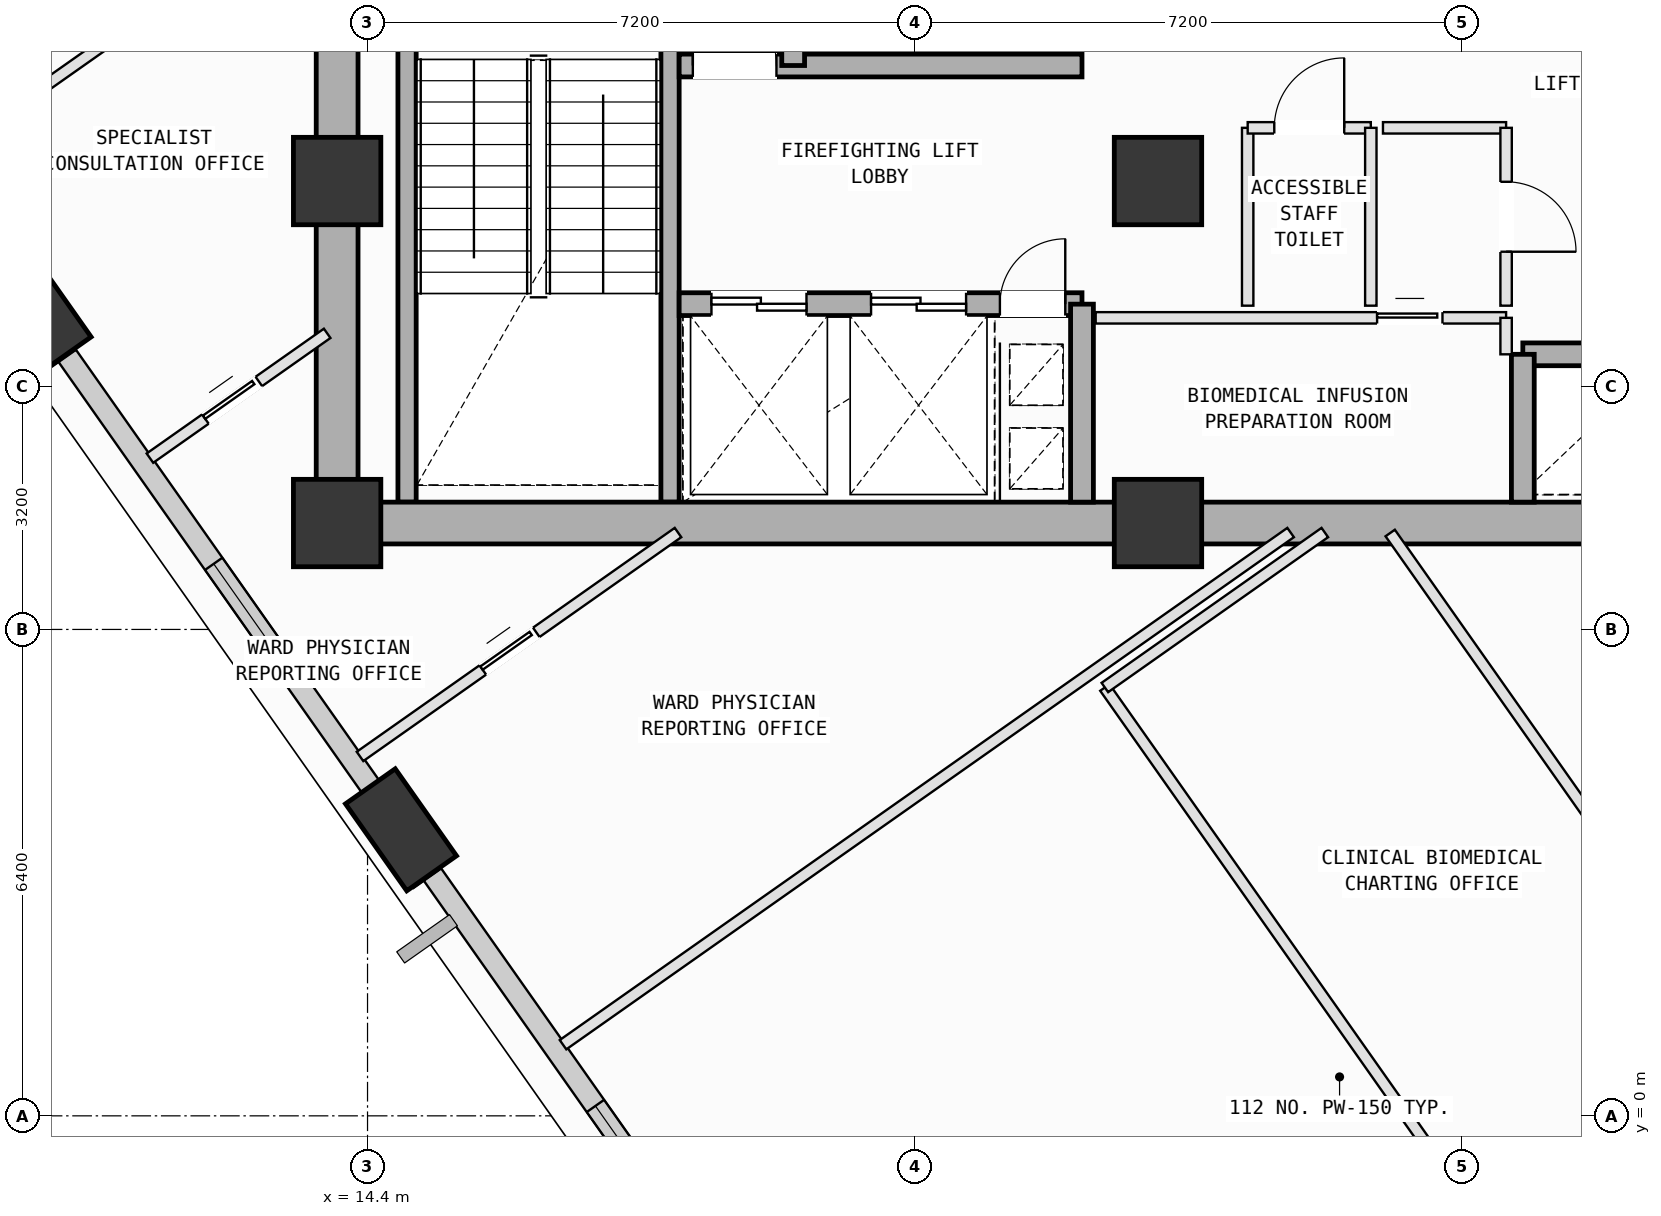
"""IFC4 building model, lengths in metres.
Left out: names, types, materials, properties, quantities, classifications, styles, units other than length and angle.
Written with IfcOpenShell. Run it as: python <this file> out.ifc"""

import sys

from ifc_helpers import new_model, si_unit, direction, frame, frame_2d, origin, origin_2d, place, context, subcontext, project, spatial, rectangle, extrude, element, fill, save


model = new_model("IFC4")
c1 = context("Model", 3, precision=1e-05, world=origin(), true_north=direction((0.0, 1.0)))
c2 = subcontext(c1, "Body", "Model", "MODEL_VIEW")
j1 = project(units=[si_unit("LENGTHUNIT", "METRE"), si_unit("PLANEANGLEUNIT", "RADIAN")], contexts=[c1])
p1 = place(None, origin())
s1 = spatial("IfcSite", under=j1, at=p1, CompositionType="ELEMENT")
p2 = place(p1, origin())
s2 = spatial("IfcBuilding", under=s1, at=p2, CompositionType="ELEMENT")
p3 = place(p2, frame((0.0, 0.0, 173.8)))
s3 = spatial("IfcBuildingStorey", under=s2, at=p3, CompositionType="ELEMENT", Elevation=173.8)
for number, where, z_axis, x_axis in (
    (1, (14.0, 7.8, 0.0), (0.0, 0.0, 1.0), (1.0, 0.0, 0.0)),
    (2, (14.0, 12.3, 0.0), (0.0, 0.0, 1.0), (1.0, 0.0, 0.0)),
    (3, (24.8, 7.8, 0.0), (0.0, 0.0, 1.0), (1.0, 0.0, 0.0)),
    (4, (24.8, 12.3, 0.0), (0.0, 0.0, 1.0), (1.0, 0.0, 0.0)),
):
    element("IfcColumn", number, at=place(p3, frame(where, z_axis=z_axis, x_axis=x_axis)), inside=s3, PredefinedType="COLUMN", context=c2, shape_type="SweptSolid", body=[
        extrude(rectangle(XDim=1.15, YDim=1.15, at=origin_2d()), origin(), (0.0, 0.0, 1.0), 4.0),
    ])
p4 = place(p3, frame((10.033, 10.591, 0.002), z_axis=(0.059361981689, -0.096569440559, 0.993554476755), x_axis=(-0.915889100043, 0.390585013166, 0.092684971335)))
e5 = element("IfcColumn", 5, at=p4, inside=s3, PredefinedType="COLUMN", context=c2, shape_type="SweptSolid", body=[
    extrude(rectangle(XDim=1.4, YDim=0.8, at=origin_2d()), origin(), (0.0, 0.0, 1.0), 4.022),
])
p5 = place(p3, frame((14.84, 3.763, 0.002), z_axis=(0.087255397934, -0.076515338522, 0.993243121548), x_axis=(-0.990187937377, 0.102585483116, 0.094889764076)))
e6 = element("IfcColumn", 6, at=p5, inside=s3, PredefinedType="COLUMN", context=c2, shape_type="SweptSolid", body=[
    extrude(rectangle(XDim=1.4, YDim=0.8, at=origin_2d()), origin(), (0.0, 0.0, 1.0), 4.023),
])
p6 = place(p3, frame((14.687, 3.981, 0.0), z_axis=(0.0, 0.0, 1.0), x_axis=(-0.575708660285, 0.817654901822, 0.0)))
e7 = element("IfcWall", 7, at=p6, inside=s3, PredefinedType="SOLIDWALL", context=c2, shape_type="SweptSolid", body=[
    extrude(rectangle(XDim=7.36, YDim=0.28, at=frame_2d((3.68, 0.0))), origin(), (0.0, 0.0, 1.0), 3.065),
])
p7 = place(p6, frame((2.614, 0.0, 0.75)))
e8 = element("IfcOpeningElement", 8, at=p7, cuts=e7, PredefinedType="OPENING", context=c2, shape_type="SweptSolid", body=[
    extrude(rectangle(XDim=1.4, YDim=1.85, at=frame_2d((0.7, 0.925))), frame((0.0, 0.15, 0.0), z_axis=(0.0, -1.0, 0.0), x_axis=(1.0, 0.0, 0.0)), (0.0, 0.0, 1.0), 0.3),
])
p8 = place(p3, frame((18.838, -1.914, 0.0), z_axis=(0.0, 0.0, 1.0), x_axis=(-0.575721738491, 0.817645693334, 0.0)))
e9 = element("IfcWall", 9, at=p8, inside=s3, PredefinedType="SOLIDWALL", context=c2, shape_type="SweptSolid", body=[
    extrude(rectangle(XDim=6.223, YDim=0.28, at=frame_2d((3.112, 0.0))), origin(), (0.0, 0.0, 1.0), 3.065),
])
p9 = place(p8, frame((0.7, 0.0, 0.75)))
e10 = element("IfcOpeningElement", 10, at=p9, cuts=e9, PredefinedType="OPENING", context=c2, shape_type="SweptSolid", body=[
    extrude(rectangle(XDim=1.8, YDim=2.05, at=frame_2d((0.9, 1.025))), frame((0.0, 0.15, 0.0), z_axis=(0.0, -1.0, 0.0), x_axis=(1.0, 0.0, 0.0)), (0.0, 0.0, 1.0), 0.3),
])
for number, where, z_axis, x_axis in (
    (11, (18.38, 15.12, 0.0), (0.0, 0.0, 1.0), (0.0, -1.0, 0.0)),
    (12, (14.92, 8.075, 0.0), (0.0, 0.0, 1.0), (0.0, 1.0, 0.0)),
):
    element("IfcWall", number, at=place(p3, frame(where, z_axis=z_axis, x_axis=x_axis)), inside=s3, PredefinedType="SOLIDWALL", context=c2, shape_type="SweptSolid", body=[
        extrude(rectangle(XDim=7.045, YDim=0.24, at=frame_2d((3.522, 0.0))), origin(), (0.0, 0.0, 1.0), 3.78),
    ])
for number, where, z_axis, x_axis in (
    (13, (14.0, 7.8, 0.0), (0.0, 0.0, 1.0), (1.0, 0.0, 0.0)),
    (14, (24.8, 7.8, 0.0), (0.0, 0.0, 1.0), (1.0, 0.0, 0.0)),
):
    element("IfcWall", number, at=place(p3, frame(where, z_axis=z_axis, x_axis=x_axis)), inside=s3, PredefinedType="SHEAR", context=c2, shape_type="SweptSolid", body=[
        extrude(rectangle(XDim=10.8, YDim=0.55, at=frame_2d((5.4, 0.0))), origin(), (0.0, 0.0, 1.0), 3.78),
    ])
p10 = place(p3, frame((14.0, 16.8, 0.0), z_axis=(0.0, 0.0, 1.0), x_axis=(0.0, -1.0, 0.0)))
e15 = element("IfcWall", 15, at=p10, inside=s3, PredefinedType="SHEAR", context=c2, shape_type="SweptSolid", body=[
    extrude(rectangle(XDim=9.0, YDim=0.55, at=frame_2d((4.5, 0.0))), origin(), (0.0, 0.0, 1.0), 3.78),
])
p11 = place(p3, frame((18.5, 10.68, 0.0), z_axis=(0.0, 0.0, 1.0), x_axis=(1.0, 0.0, 0.0)))
e16 = element("IfcWall", 16, at=p11, inside=s3, PredefinedType="SOLIDWALL", context=c2, shape_type="SweptSolid", body=[
    extrude(rectangle(XDim=5.3, YDim=0.3, at=frame_2d((2.65, 0.0))), origin(), (0.0, 0.0, 1.0), 3.78),
])
p12 = place(p11, frame((4.22, 0.0, 0.0)))
e17 = element("IfcOpeningElement", 17, at=p12, cuts=e16, PredefinedType="OPENING", context=c2, shape_type="SweptSolid", body=[
    extrude(rectangle(XDim=0.86, YDim=2.06, at=frame_2d((0.43, 1.03))), frame((0.0, 0.16, 0.0), z_axis=(0.0, -1.0, 0.0), x_axis=(1.0, 0.0, 0.0)), (0.0, 0.0, 1.0), 0.32),
])
p13 = place(p11, frame((0.425, 0.0, 0.0)))
e18 = element("IfcOpeningElement", 18, at=p13, cuts=e16, PredefinedType="OPENING", context=c2, shape_type="SweptSolid", body=[
    extrude(rectangle(XDim=1.25, YDim=2.18, at=frame_2d((0.625, 1.09))), frame((0.0, 0.16, 0.0), z_axis=(0.0, -1.0, 0.0), x_axis=(1.0, 0.0, 0.0)), (0.0, 0.0, 1.0), 0.32),
])
p14 = place(p11, frame((2.525, 0.0, 0.0)))
e19 = element("IfcOpeningElement", 19, at=p14, cuts=e16, PredefinedType="OPENING", context=c2, shape_type="SweptSolid", body=[
    extrude(rectangle(XDim=1.25, YDim=2.18, at=frame_2d((0.625, 1.09))), frame((0.0, 0.16, 0.0), z_axis=(0.0, -1.0, 0.0), x_axis=(1.0, 0.0, 0.0)), (0.0, 0.0, 1.0), 0.32),
])
p15 = place(p3, frame((18.5, 13.82, 0.0), z_axis=(0.0, 0.0, 1.0), x_axis=(1.0, 0.0, 0.0)))
e20 = element("IfcWall", 20, at=p15, inside=s3, PredefinedType="SOLIDWALL", context=c2, shape_type="SweptSolid", body=[
    extrude(rectangle(XDim=5.3, YDim=0.3, at=frame_2d((2.65, 0.0))), origin(), (0.0, 0.0, 1.0), 3.78),
])
p16 = place(p15, frame((0.18, 0.0, 0.0)))
e21 = element("IfcOpeningElement", 21, at=p16, cuts=e20, PredefinedType="OPENING", context=c2, shape_type="SweptSolid", body=[
    extrude(rectangle(XDim=1.1, YDim=2.15, at=frame_2d((0.55, 1.075))), frame((0.0, 0.16, 0.0), z_axis=(0.0, -1.0, 0.0), x_axis=(1.0, 0.0, 0.0)), (0.0, 0.0, 1.0), 0.32),
])
p17 = place(p3, frame((23.8, 8.075, 0.0), z_axis=(0.0, 0.0, 1.0), x_axis=(0.0, 1.0, 0.0)))
e22 = element("IfcWall", 22, at=p17, inside=s3, PredefinedType="SOLIDWALL", context=c2, shape_type="SweptSolid", body=[
    extrude(rectangle(XDim=2.605, YDim=0.3, at=frame_2d((1.302, 0.0))), origin(), (0.0, 0.0, 1.0), 3.78),
])
p18 = place(p3, frame((20.0, 13.82, 0.0), z_axis=(0.0, 0.0, 1.0), x_axis=(0.0, 1.0, 0.0)))
e23 = element("IfcWall", 23, at=p18, inside=s3, PredefinedType="SOLIDWALL", context=c2, shape_type="SweptSolid", body=[
    extrude(rectangle(XDim=2.73, YDim=0.3, at=frame_2d((1.365, 0.0))), origin(), (0.0, 0.0, 1.0), 3.78),
])
p19 = place(p3, frame((29.6, 10.02, 0.0), z_axis=(0.0, 0.0, 1.0), x_axis=(1.0, 0.0, 0.0)))
e24 = element("IfcWall", 24, at=p19, inside=s3, PredefinedType="SOLIDWALL", context=c2, shape_type="SweptSolid", body=[
    extrude(rectangle(XDim=1.7, YDim=0.3, at=frame_2d((0.85, 0.0))), origin(), (0.0, 0.0, 1.0), 3.78),
])
p20 = place(p3, frame((29.6, 8.075, 0.0), z_axis=(0.0, 0.0, 1.0), x_axis=(0.0, 1.0, 0.0)))
e25 = element("IfcWall", 25, at=p20, inside=s3, PredefinedType="SOLIDWALL", context=c2, shape_type="SweptSolid", body=[
    extrude(rectangle(XDim=1.945, YDim=0.3, at=frame_2d((0.973, 0.0))), origin(), (0.0, 0.0, 1.0), 3.78),
])
p21 = place(p3, frame((23.98, 10.5, 0.0), z_axis=(0.0, 0.0, 1.0), x_axis=(1.0, 0.0, 0.0)))
e26 = element("IfcWall", 26, at=p21, inside=s3, PredefinedType="PARTITIONING", context=c2, shape_type="SweptSolid", body=[
    extrude(rectangle(XDim=5.4, YDim=0.15, at=frame_2d((2.7, 0.0))), origin(), (0.0, 0.0, 1.0), 3.78),
])
p22 = place(p21, frame((3.703, 0.0, 0.0)))
e27 = element("IfcOpeningElement", 27, at=p22, cuts=e26, PredefinedType="OPENING", context=c2, shape_type="SweptSolid", body=[
    extrude(rectangle(XDim=0.86, YDim=2.06, at=frame_2d((0.43, 1.03))), frame((0.0, 0.085, 0.0), z_axis=(0.0, -1.0, 0.0), x_axis=(1.0, 0.0, 0.0)), (0.0, 0.0, 1.0), 0.17),
])
p23 = place(p3, frame((29.38, 10.5, 0.0), z_axis=(0.0, 0.0, 1.0), x_axis=(0.0, -1.0, 0.0)))
e28 = element("IfcWall", 28, at=p23, inside=s3, PredefinedType="PARTITIONING", context=c2, shape_type="SweptSolid", body=[
    extrude(rectangle(XDim=0.48, YDim=0.15, at=frame_2d((0.24, 0.0))), origin(), (0.0, 0.0, 1.0), 3.78),
])
p24 = place(p3, frame((25.98, 10.66, 0.0), z_axis=(0.0, 0.0, 1.0), x_axis=(0.0, 1.0, 0.0)))
e29 = element("IfcWall", 29, at=p24, inside=s3, PredefinedType="PARTITIONING", context=c2, shape_type="SweptSolid", body=[
    extrude(rectangle(XDim=2.34, YDim=0.15, at=frame_2d((1.17, 0.0))), origin(), (0.0, 0.0, 1.0), 3.78),
])
p25 = place(p3, frame((25.98, 13.0, 0.0), z_axis=(0.0, 0.0, 1.0), x_axis=(1.0, 0.0, 0.0)))
e30 = element("IfcWall", 30, at=p25, inside=s3, PredefinedType="PARTITIONING", context=c2, shape_type="SweptSolid", body=[
    extrude(rectangle(XDim=1.62, YDim=0.15, at=frame_2d((0.81, 0.0))), origin(), (0.0, 0.0, 1.0), 3.78),
])
p26 = place(p25, frame((0.35, 0.0, 0.0)))
e31 = element("IfcOpeningElement", 31, at=p26, cuts=e30, PredefinedType="OPENING", context=c2, shape_type="SweptSolid", body=[
    extrude(rectangle(XDim=0.92, YDim=2.1, at=frame_2d((0.46, 1.05))), frame((0.0, 0.085, 0.0), z_axis=(0.0, -1.0, 0.0), x_axis=(1.0, 0.0, 0.0)), (0.0, 0.0, 1.0), 0.17),
])
p27 = place(p3, frame((27.6, 13.0, 0.0), z_axis=(0.0, 0.0, 1.0), x_axis=(0.0, -1.0, 0.0)))
e32 = element("IfcWall", 32, at=p27, inside=s3, PredefinedType="PARTITIONING", context=c2, shape_type="SweptSolid", body=[
    extrude(rectangle(XDim=2.34, YDim=0.15, at=frame_2d((1.17, 0.0))), origin(), (0.0, 0.0, 1.0), 3.78),
])
p28 = place(p3, frame((27.76, 13.0, 0.0), z_axis=(0.0, 0.0, 1.0), x_axis=(1.0, 0.0, 0.0)))
e33 = element("IfcWall", 33, at=p28, inside=s3, PredefinedType="PARTITIONING", context=c2, shape_type="SweptSolid", body=[
    extrude(rectangle(XDim=1.62, YDim=0.15, at=frame_2d((0.81, 0.0))), origin(), (0.0, 0.0, 1.0), 3.78),
])
p29 = place(p3, frame((29.38, 13.0, 0.0), z_axis=(0.0, 0.0, 1.0), x_axis=(0.0, -1.0, 0.0)))
e34 = element("IfcWall", 34, at=p29, inside=s3, PredefinedType="PARTITIONING", context=c2, shape_type="SweptSolid", body=[
    extrude(rectangle(XDim=2.34, YDim=0.15, at=frame_2d((1.17, 0.0))), origin(), (0.0, 0.0, 1.0), 3.78),
])
p30 = place(p29, frame((0.71, 0.0, 0.0)))
e35 = element("IfcOpeningElement", 35, at=p30, cuts=e34, PredefinedType="OPENING", context=c2, shape_type="SweptSolid", body=[
    extrude(rectangle(XDim=0.92, YDim=2.1, at=frame_2d((0.46, 1.05))), frame((0.0, 0.085, 0.0), z_axis=(0.0, -1.0, 0.0), x_axis=(1.0, 0.0, 0.0)), (0.0, 0.0, 1.0), 0.17),
])
p31 = place(p3, frame((30.972, -4.122, 0.0), z_axis=(0.0, 0.0, 1.0), x_axis=(-0.57572141369, 0.817645922034, 0.0)))
e36 = element("IfcWall", 36, at=p31, inside=s3, PredefinedType="PARTITIONING", context=c2, shape_type="SweptSolid", body=[
    extrude(rectangle(XDim=11.934, YDim=0.15, at=frame_2d((5.967, 0.0))), origin(), (0.0, 0.0, 1.0), 3.78),
])
p32 = place(p3, frame((24.101, 5.636, 0.0), z_axis=(0.0, 0.0, 1.0), x_axis=(0.817472101836, 0.575968195928, 0.0)))
e37 = element("IfcWall", 37, at=p32, inside=s3, PredefinedType="PARTITIONING", context=c2, shape_type="SweptSolid", body=[
    extrude(rectangle(XDim=3.54, YDim=0.15, at=frame_2d((1.77, 0.0))), origin(), (0.0, 0.0, 1.0), 3.78),
])
p33 = place(p3, frame((27.855, 7.669, 0.0), z_axis=(0.0, 0.0, 1.0), x_axis=(0.57575409581, -0.8176229089, 0.0)))
e38 = element("IfcWall", 38, at=p33, inside=s3, PredefinedType="PARTITIONING", context=c2, shape_type="SweptSolid", body=[
    extrude(rectangle(XDim=11.435, YDim=0.15, at=frame_2d((5.718, 0.0))), origin(), (0.0, 0.0, 1.0), 3.78),
])
p34 = place(p33, frame((5.471, 0.0, 0.0)))
e39 = element("IfcOpeningElement", 39, at=p34, cuts=e38, PredefinedType="OPENING", context=c2, shape_type="SweptSolid", body=[
    extrude(rectangle(XDim=0.86, YDim=2.06, at=frame_2d((0.43, 1.03))), frame((0.0, 0.085, 0.0), z_axis=(0.0, -1.0, 0.0), x_axis=(1.0, 0.0, 0.0)), (0.0, 0.0, 1.0), 0.17),
])
p35 = place(p3, frame((15.067, 3.042, 0.0), z_axis=(0.0, 0.0, 1.0), x_axis=(-0.575419868923, 0.817858162794, 0.0)))
e40 = element("IfcWall", 40, at=p35, inside=s3, PredefinedType="PARTITIONING", context=c2, shape_type="SweptSolid", body=[
    extrude(rectangle(XDim=0.987, YDim=0.15, at=frame_2d((0.493, 0.0))), origin(), (0.0, 0.0, 1.0), 3.065),
])
p36 = place(p3, frame((14.301, 4.729, 0.0), z_axis=(0.0, 0.0, 1.0), x_axis=(0.81765087294, 0.575714382295, 0.0)))
e41 = element("IfcWall", 41, at=p36, inside=s3, PredefinedType="PARTITIONING", context=c2, shape_type="SweptSolid", body=[
    extrude(rectangle(XDim=5.117, YDim=0.15, at=frame_2d((2.559, 0.0))), origin(), (0.0, 0.0, 1.0), 3.78),
])
p37 = place(p36, frame((1.976, 0.0, 0.0)))
e42 = element("IfcOpeningElement", 42, at=p37, cuts=e41, PredefinedType="OPENING", context=c2, shape_type="SweptSolid", body=[
    extrude(rectangle(XDim=0.86, YDim=2.06, at=frame_2d((0.43, 1.03))), frame((0.0, 0.085, 0.0), z_axis=(0.0, -1.0, 0.0), x_axis=(1.0, 0.0, 0.0)), (0.0, 0.0, 1.0), 0.17),
])
p38 = place(p3, frame((26.545, 7.675, 0.0), z_axis=(0.0, 0.0, 1.0), x_axis=(-0.817707532324, -0.575633904127, 0.0)))
e43 = element("IfcWall", 43, at=p38, inside=s3, PredefinedType="PARTITIONING", context=c2, shape_type="SweptSolid", body=[
    extrude(rectangle(XDim=11.707, YDim=0.15, at=frame_2d((5.854, 0.0))), origin(), (0.0, 0.0, 1.0), 3.78),
])
p39 = place(p3, frame((11.537, 8.654, 0.0), z_axis=(0.0, 0.0, 1.0), x_axis=(0.817648208758, 0.575718166045, 0.0)))
e44 = element("IfcWall", 44, at=p39, inside=s3, PredefinedType="PARTITIONING", context=c2, shape_type="SweptSolid", body=[
    extrude(rectangle(XDim=2.852, YDim=0.15, at=frame_2d((1.426, 0.0))), origin(), (0.0, 0.0, 1.0), 3.78),
])
p40 = place(p39, frame((0.893, 0.0, 0.0)))
e45 = element("IfcOpeningElement", 45, at=p40, cuts=e44, PredefinedType="OPENING", context=c2, shape_type="SweptSolid", body=[
    extrude(rectangle(XDim=0.86, YDim=2.06, at=frame_2d((0.43, 1.03))), frame((0.0, 0.085, 0.0), z_axis=(0.0, -1.0, 0.0), x_axis=(1.0, 0.0, 0.0)), (0.0, 0.0, 1.0), 0.17),
])
p41 = place(p3, frame((10.261, 9.867, 0.0), z_axis=(0.0, 0.0, 1.0), x_axis=(-0.575706777747, 0.817656227309, 0.0)))
e46 = element("IfcWall", 46, at=p41, inside=s3, PredefinedType="PARTITIONING", context=c2, shape_type="SweptSolid", body=[
    extrude(rectangle(XDim=0.992, YDim=0.15, at=frame_2d((0.496, 0.0))), origin(), (0.0, 0.0, 1.0), 3.265),
])
p42 = place(p3, frame((8.774, 12.579, 0.0), z_axis=(0.0, 0.0, 1.0), x_axis=(0.817686785851, 0.575663374069, 0.0)))
e47 = element("IfcWall", 47, at=p42, inside=s3, PredefinedType="PARTITIONING", context=c2, shape_type="SweptSolid", body=[
    extrude(rectangle(XDim=7.4, YDim=0.15, at=frame_2d((3.7, 0.0))), origin(), (0.0, 0.0, 1.0), 3.78),
])
p43 = place(p42, frame((3.1, 0.0, 0.0)))
e48 = element("IfcOpeningElement", 48, at=p43, cuts=e47, PredefinedType="OPENING", context=c2, shape_type="SweptSolid", body=[
    extrude(rectangle(XDim=1.2, YDim=2.15, at=frame_2d((0.6, 1.075))), frame((0.0, 0.085, 0.0), z_axis=(0.0, -1.0, 0.0), x_axis=(1.0, 0.0, 0.0)), (0.0, 0.0, 1.0), 0.17),
])
p44 = place(p7, origin())
e49 = element("IfcWindow", 49, at=p44, inside=s3, PartitioningType="SINGLE_PANEL", PredefinedType="WINDOW", context=c2, shape_type="SweptSolid", body=[
    extrude(rectangle(XDim=1.4, YDim=1.85, at=frame_2d((0.7, 0.925))), frame((0.0, 0.03, 0.0), z_axis=(0.0, -1.0, 0.0), x_axis=(1.0, 0.0, 0.0)), (0.0, 0.0, 1.0), 0.06),
])
fill(e8, e49)
p45 = place(p9, origin())
e50 = element("IfcWindow", 50, at=p45, inside=s3, PartitioningType="SINGLE_PANEL", PredefinedType="WINDOW", context=c2, shape_type="SweptSolid", body=[
    extrude(rectangle(XDim=1.8, YDim=2.05, at=frame_2d((0.9, 1.025))), frame((0.0, 0.03, 0.0), z_axis=(0.0, -1.0, 0.0), x_axis=(1.0, 0.0, 0.0)), (0.0, 0.0, 1.0), 0.06),
])
fill(e10, e50)
p46 = place(p12, origin())
e51 = element("IfcDoor", 51, at=p46, inside=s3, OperationType="SINGLE_SWING_RIGHT", PredefinedType="DOOR", context=c2, shape_type="SweptSolid", body=[
    extrude(rectangle(XDim=0.86, YDim=2.06, at=frame_2d((0.43, 1.03))), frame((0.0, 0.025, 0.0), z_axis=(0.0, -1.0, 0.0), x_axis=(1.0, 0.0, 0.0)), (0.0, 0.0, 1.0), 0.05),
])
fill(e17, e51)
p47 = place(p16, origin())
e52 = element("IfcDoor", 52, at=p47, inside=s3, OperationType="SINGLE_SWING_LEFT", PredefinedType="DOOR", context=c2, shape_type="SweptSolid", body=[
    extrude(rectangle(XDim=1.1, YDim=2.15, at=frame_2d((0.55, 1.075))), frame((0.0, 0.025, 0.0), z_axis=(0.0, -1.0, 0.0), x_axis=(1.0, 0.0, 0.0)), (0.0, 0.0, 1.0), 0.05),
])
fill(e21, e52)
p48 = place(p13, origin())
e53 = element("IfcDoor", 53, at=p48, inside=s3, OperationType="DOUBLE_DOOR_SLIDING", PredefinedType="DOOR", context=c2, shape_type="SweptSolid", body=[
    extrude(rectangle(XDim=1.25, YDim=2.18, at=frame_2d((0.625, 1.09))), frame((0.0, 0.025, 0.0), z_axis=(0.0, -1.0, 0.0), x_axis=(1.0, 0.0, 0.0)), (0.0, 0.0, 1.0), 0.05),
])
fill(e18, e53)
p49 = place(p14, origin())
e54 = element("IfcDoor", 54, at=p49, inside=s3, OperationType="DOUBLE_DOOR_SLIDING", PredefinedType="DOOR", context=c2, shape_type="SweptSolid", body=[
    extrude(rectangle(XDim=1.25, YDim=2.18, at=frame_2d((0.625, 1.09))), frame((0.0, 0.025, 0.0), z_axis=(0.0, -1.0, 0.0), x_axis=(1.0, 0.0, 0.0)), (0.0, 0.0, 1.0), 0.05),
])
fill(e19, e54)
p50 = place(p26, origin())
e55 = element("IfcDoor", 55, at=p50, inside=s3, OperationType="SINGLE_SWING_RIGHT", PredefinedType="DOOR", context=c2, shape_type="SweptSolid", body=[
    extrude(rectangle(XDim=0.92, YDim=2.1, at=frame_2d((0.46, 1.05))), frame((0.0, 0.025, 0.0), z_axis=(0.0, -1.0, 0.0), x_axis=(1.0, 0.0, 0.0)), (0.0, 0.0, 1.0), 0.05),
])
fill(e31, e55)
p51 = place(p30, origin())
e56 = element("IfcDoor", 56, at=p51, inside=s3, OperationType="SINGLE_SWING_RIGHT", PredefinedType="DOOR", context=c2, shape_type="SweptSolid", body=[
    extrude(rectangle(XDim=0.92, YDim=2.1, at=frame_2d((0.46, 1.05))), frame((0.0, 0.025, 0.0), z_axis=(0.0, -1.0, 0.0), x_axis=(1.0, 0.0, 0.0)), (0.0, 0.0, 1.0), 0.05),
])
fill(e35, e56)
p52 = place(p22, origin())
e57 = element("IfcDoor", 57, at=p52, inside=s3, OperationType="SLIDING_TO_LEFT", PredefinedType="DOOR", context=c2, shape_type="SweptSolid", body=[
    extrude(rectangle(XDim=0.86, YDim=2.06, at=frame_2d((0.43, 1.03))), frame((0.0, 0.025, 0.0), z_axis=(0.0, -1.0, 0.0), x_axis=(1.0, 0.0, 0.0)), (0.0, 0.0, 1.0), 0.05),
])
fill(e27, e57)
p53 = place(p40, origin())
e58 = element("IfcDoor", 58, at=p53, inside=s3, OperationType="SLIDING_TO_LEFT", PredefinedType="DOOR", context=c2, shape_type="SweptSolid", body=[
    extrude(rectangle(XDim=0.86, YDim=2.06, at=frame_2d((0.43, 1.03))), frame((0.0, 0.025, 0.0), z_axis=(0.0, -1.0, 0.0), x_axis=(1.0, 0.0, 0.0)), (0.0, 0.0, 1.0), 0.05),
])
fill(e45, e58)
p54 = place(p37, origin())
e59 = element("IfcDoor", 59, at=p54, inside=s3, OperationType="SLIDING_TO_LEFT", PredefinedType="DOOR", context=c2, shape_type="SweptSolid", body=[
    extrude(rectangle(XDim=0.86, YDim=2.06, at=frame_2d((0.43, 1.03))), frame((0.0, 0.025, 0.0), z_axis=(0.0, -1.0, 0.0), x_axis=(1.0, 0.0, 0.0)), (0.0, 0.0, 1.0), 0.05),
])
fill(e42, e59)
save(model, sys.argv[1])
